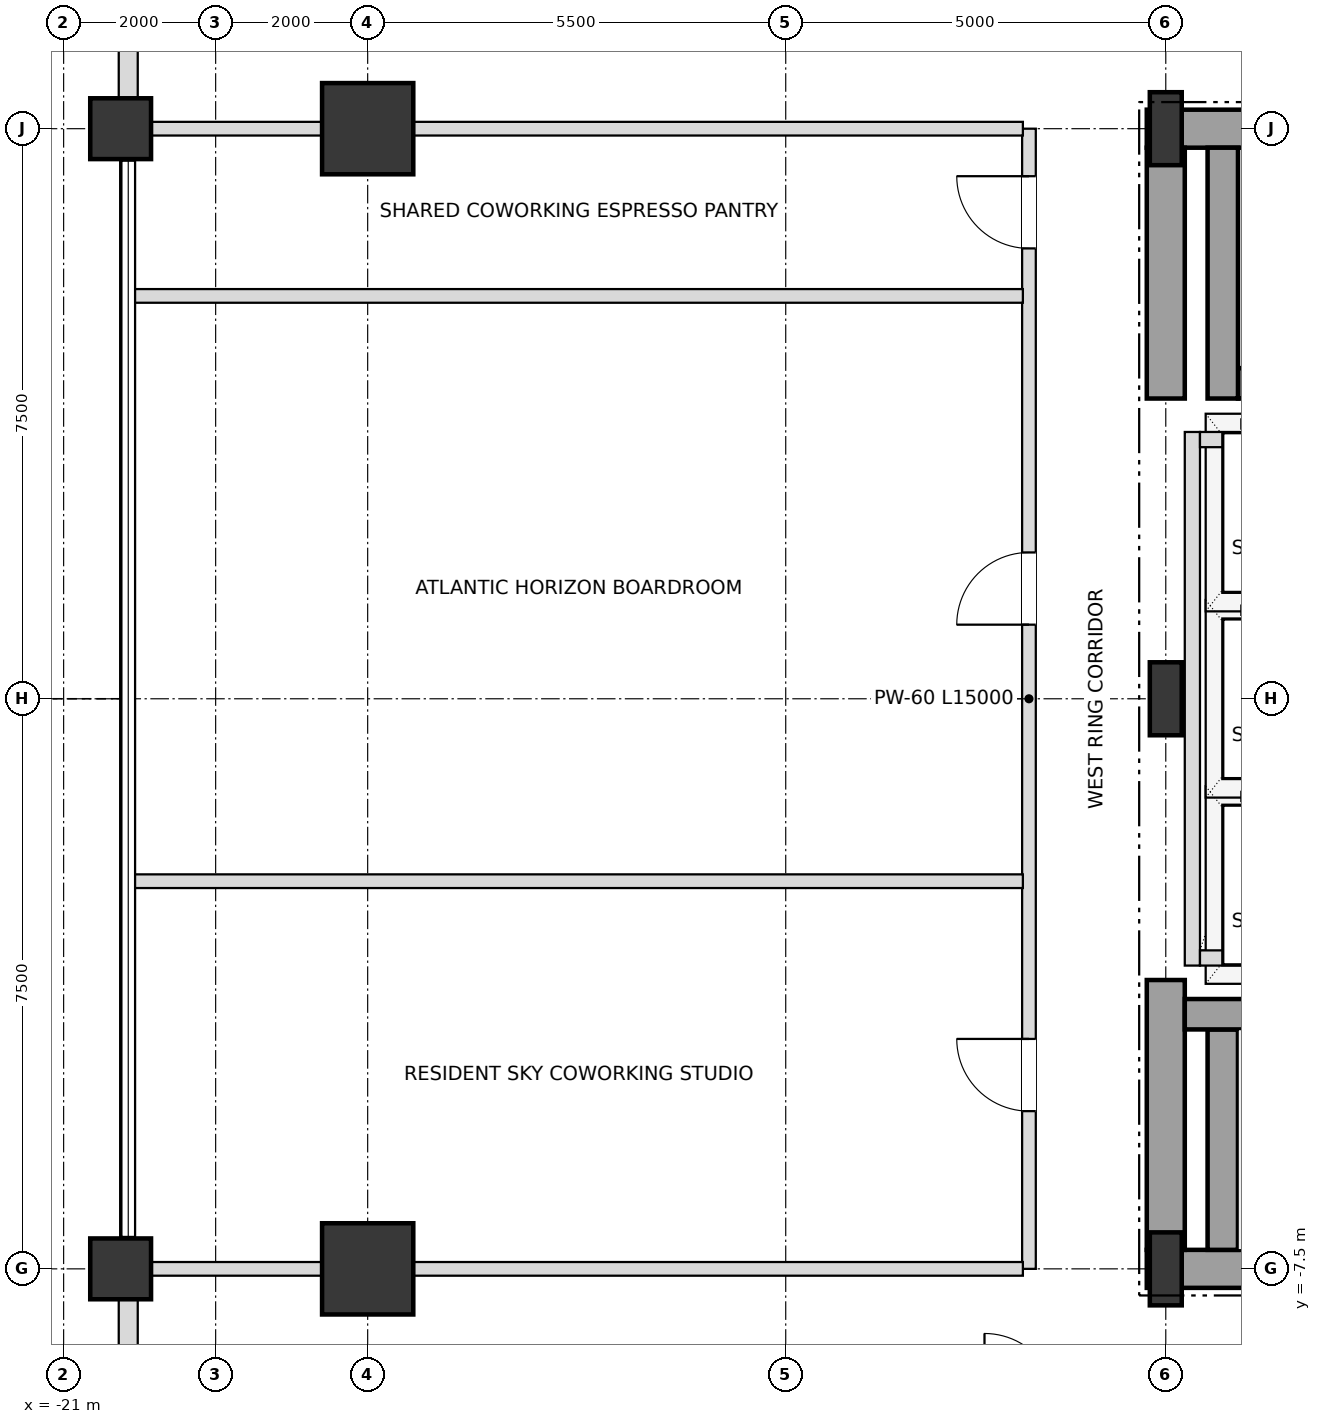
"""IFC4 building model, lengths in metres.
Left out: names, types, materials, properties, quantities, classifications, styles, units other than length and angle.
Written with IfcOpenShell. Run it as: python <this file> out.ifc"""

import sys

from ifc_helpers import new_model, si_unit, direction, frame, frame_2d, origin, origin_2d, place, context, subcontext, project, spatial, rectangle, i_section, extrude, element, fill, save


model = new_model("IFC4")
c1 = context("Model", 3, precision=1e-05, world=origin(), true_north=direction((0.0, 1.0)))
c2 = subcontext(c1, "Body", "Model", "MODEL_VIEW")
j1 = project(units=[si_unit("LENGTHUNIT", "METRE"), si_unit("PLANEANGLEUNIT", "RADIAN")], contexts=[c1])
p1 = place(None, origin())
s1 = spatial("IfcSite", under=j1, at=p1, CompositionType="ELEMENT")
p2 = place(p1, origin())
s2 = spatial("IfcBuilding", under=s1, at=p2, CompositionType="ELEMENT")
p3 = place(p2, frame((0.0, 0.0, 109.8)))
s3 = spatial("IfcBuildingStorey", under=s2, at=p3, CompositionType="ELEMENT", Elevation=109.8)
for number, where, z_axis, x_axis in (
    (1, (-6.5, -7.5, 0.0), (0.0, 0.0, 1.0), (1.0, 0.0, 0.0)),
    (2, (-6.5, 0.0, 0.0), (0.0, 0.0, 1.0), (1.0, 0.0, 0.0)),
    (3, (-6.5, 7.5, 0.0), (0.0, 0.0, 1.0), (1.0, 0.0, 0.0)),
):
    element("IfcColumn", number, at=place(p3, frame(where, z_axis=z_axis, x_axis=x_axis)), inside=s3, PredefinedType="COLUMN", context=c2, shape_type="SweptSolid", body=[
        extrude(i_section(OverallWidth=0.42, OverallDepth=0.96, WebThickness=0.022, FlangeThickness=0.034, at=origin_2d()), origin(), (0.0, 0.0, 1.0), 3.6),
    ])
for number, where, z_axis, x_axis in (
    (4, (-17.0, 7.5, 0.0), (0.0, 0.0, 1.0), (1.0, 0.0, 0.0)),
    (5, (-17.0, -7.5, 0.0), (0.0, 0.0, 1.0), (1.0, 0.0, 0.0)),
):
    element("IfcColumn", number, at=place(p3, frame(where, z_axis=z_axis, x_axis=x_axis)), inside=s3, PredefinedType="USERDEFINED", context=c2, shape_type="SweptSolid", body=[
        extrude(rectangle(XDim=1.2, YDim=1.2, at=origin_2d()), origin(), (0.0, 0.0, 1.0), 3.6),
    ])
for number, where, z_axis, x_axis in (
    (6, (-20.25, -7.5, 0.0), (0.0, 0.0, 1.0), (1.0, 0.0, 0.0)),
    (7, (-20.25, 7.5, 0.0), (0.0, 0.0, 1.0), (1.0, 0.0, 0.0)),
):
    element("IfcColumn", number, at=place(p3, frame(where, z_axis=z_axis, x_axis=x_axis)), inside=s3, PredefinedType="COLUMN", context=c2, shape_type="SweptSolid", body=[
        extrude(rectangle(XDim=0.8, YDim=0.8, at=origin_2d()), origin(), (0.0, 0.0, 1.0), 3.6),
    ])
p4 = place(p3, frame((-20.15, 12.605, 0.0), z_axis=(0.0, 0.0, 1.0), x_axis=(0.0, -1.0, 0.0)))
e8 = element("IfcWall", 8, at=p4, inside=s3, PredefinedType="SOLIDWALL", context=c2, shape_type="SweptSolid", body=[
    extrude(rectangle(XDim=4.71, YDim=0.25, at=frame_2d((2.355, 0.0))), origin(), (0.0, 0.0, 1.0), 2.736),
])
p5 = place(p4, frame((1.455, 0.0, 0.72)))
e9 = element("IfcOpeningElement", 9, at=p5, cuts=e8, PredefinedType="OPENING", context=c2, shape_type="SweptSolid", body=[
    extrude(rectangle(XDim=1.8, YDim=1.68, at=frame_2d((0.9, 0.84))), frame((0.0, 0.135, 0.0), z_axis=(0.0, -1.0, 0.0), x_axis=(1.0, 0.0, 0.0)), (0.0, 0.0, 1.0), 0.27),
])
p6 = place(p3, frame((-20.15, -7.895, 0.0), z_axis=(0.0, 0.0, 1.0), x_axis=(0.0, -1.0, 0.0)))
e10 = element("IfcWall", 10, at=p6, inside=s3, PredefinedType="SOLIDWALL", context=c2, shape_type="SweptSolid", body=[
    extrude(rectangle(XDim=4.71, YDim=0.25, at=frame_2d((2.355, 0.0))), origin(), (0.0, 0.0, 1.0), 2.736),
])
p7 = place(p6, frame((1.455, 0.0, 0.72)))
e11 = element("IfcOpeningElement", 11, at=p7, cuts=e10, PredefinedType="OPENING", context=c2, shape_type="SweptSolid", body=[
    extrude(rectangle(XDim=1.8, YDim=1.68, at=frame_2d((0.9, 0.84))), frame((0.0, 0.135, 0.0), z_axis=(0.0, -1.0, 0.0), x_axis=(1.0, 0.0, 0.0)), (0.0, 0.0, 1.0), 0.27),
])
p8 = place(p3, frame((-6.75, -7.5, 0.0), z_axis=(0.0, 0.0, 1.0), x_axis=(1.0, 0.0, 0.0)))
e12 = element("IfcWall", 12, at=p8, inside=s3, PredefinedType="SHEAR", context=c2, shape_type="SweptSolid", body=[
    extrude(rectangle(XDim=6.75, YDim=0.5, at=frame_2d((3.375, 0.0))), origin(), (0.0, 0.0, 1.0), 3.38),
])
p9 = place(p3, frame((-6.75, 7.5, 0.0), z_axis=(0.0, 0.0, 1.0), x_axis=(1.0, 0.0, 0.0)))
e13 = element("IfcWall", 13, at=p9, inside=s3, PredefinedType="SHEAR", context=c2, shape_type="SweptSolid", body=[
    extrude(rectangle(XDim=6.75, YDim=0.5, at=frame_2d((3.375, 0.0))), origin(), (0.0, 0.0, 1.0), 3.38),
])
p10 = place(p9, frame((1.65, 0.0, 0.0)))
e14 = element("IfcOpeningElement", 14, at=p10, cuts=e13, PredefinedType="OPENING", context=c2, shape_type="SweptSolid", body=[
    extrude(rectangle(XDim=1.05, YDim=2.15, at=frame_2d((0.525, 1.075))), frame((0.0, 0.26, 0.0), z_axis=(0.0, -1.0, 0.0), x_axis=(1.0, 0.0, 0.0)), (0.0, 0.0, 1.0), 0.52),
])
p11 = place(p3, frame((-6.5, -7.25, 0.0), z_axis=(0.0, 0.0, 1.0), x_axis=(0.0, 1.0, 0.0)))
e15 = element("IfcWall", 15, at=p11, inside=s3, PredefinedType="SHEAR", context=c2, shape_type="SweptSolid", body=[
    extrude(rectangle(XDim=3.55, YDim=0.5, at=frame_2d((1.775, 0.0))), origin(), (0.0, 0.0, 1.0), 3.38),
])
p12 = place(p3, frame((-6.5, 3.95, 0.0), z_axis=(0.0, 0.0, 1.0), x_axis=(0.0, 1.0, 0.0)))
e16 = element("IfcWall", 16, at=p12, inside=s3, PredefinedType="SHEAR", context=c2, shape_type="SweptSolid", body=[
    extrude(rectangle(XDim=3.3, YDim=0.5, at=frame_2d((1.65, 0.0))), origin(), (0.0, 0.0, 1.0), 3.38),
])
p13 = place(p3, frame((-5.75, -7.25, 0.0), z_axis=(0.0, 0.0, 1.0), x_axis=(0.0, 1.0, 0.0)))
e17 = element("IfcWall", 17, at=p13, inside=s3, PredefinedType="SHEAR", context=c2, shape_type="SweptSolid", body=[
    extrude(rectangle(XDim=2.9, YDim=0.4, at=frame_2d((1.45, 0.0))), origin(), (0.0, 0.0, 1.0), 3.38),
])
p14 = place(p3, frame((-6.25, -4.15, 0.0), z_axis=(0.0, 0.0, 1.0), x_axis=(1.0, 0.0, 0.0)))
e18 = element("IfcWall", 18, at=p14, inside=s3, PredefinedType="SHEAR", context=c2, shape_type="SweptSolid", body=[
    extrude(rectangle(XDim=7.78, YDim=0.4, at=frame_2d((3.89, 0.0))), origin(), (0.0, 0.0, 1.0), 3.38),
])
p15 = place(p3, frame((-5.55, 4.15, 0.0), z_axis=(0.0, 0.0, 1.0), x_axis=(1.0, 0.0, 0.0)))
e19 = element("IfcWall", 19, at=p15, inside=s3, PredefinedType="SHEAR", context=c2, shape_type="SweptSolid", body=[
    extrude(rectangle(XDim=7.08, YDim=0.4, at=frame_2d((3.54, 0.0))), origin(), (0.0, 0.0, 1.0), 3.38),
])
p16 = place(p3, frame((-5.75, 3.95, 0.0), z_axis=(0.0, 0.0, 1.0), x_axis=(0.0, 1.0, 0.0)))
e20 = element("IfcWall", 20, at=p16, inside=s3, PredefinedType="SHEAR", context=c2, shape_type="SweptSolid", body=[
    extrude(rectangle(XDim=3.3, YDim=0.4, at=frame_2d((1.65, 0.0))), origin(), (0.0, 0.0, 1.0), 3.38),
])
p17 = place(p3, frame((-6.15, -3.51, 0.0), z_axis=(0.0, 0.0, 1.0), x_axis=(0.0, 1.0, 0.0)))
e21 = element("IfcWall", 21, at=p17, inside=s3, PredefinedType="SOLIDWALL", context=c2, shape_type="SweptSolid", body=[
    extrude(rectangle(XDim=7.02, YDim=0.2, at=frame_2d((3.51, 0.0))), origin(), (0.0, 0.0, 1.0), 3.38),
])
for number, where, z_axis, x_axis in (
    (22, (-6.05, -3.41, 0.0), (0.0, 0.0, 1.0), (1.0, 0.0, 0.0)),
    (23, (-6.05, 3.41, 0.0), (0.0, 0.0, 1.0), (1.0, 0.0, 0.0)),
):
    element("IfcWall", number, at=place(p3, frame(where, z_axis=z_axis, x_axis=x_axis)), inside=s3, PredefinedType="SOLIDWALL", context=c2, shape_type="SweptSolid", body=[
        extrude(rectangle(XDim=2.2, YDim=0.2, at=frame_2d((1.1, 0.0))), origin(), (0.0, 0.0, 1.0), 3.38),
    ])
p18 = place(p3, frame((-8.3, -7.5, 0.0), z_axis=(0.0, 0.0, 1.0), x_axis=(0.0, 1.0, 0.0)))
e24 = element("IfcWall", 24, at=p18, inside=s3, PredefinedType="PARTITIONING", context=c2, shape_type="SweptSolid", body=[
    extrude(rectangle(XDim=15.0, YDim=0.18, at=frame_2d((7.5, 0.0))), origin(), (0.0, 0.0, 1.0), 3.38),
])
p19 = place(p18, frame((2.075, 0.0, 0.0)))
e25 = element("IfcOpeningElement", 25, at=p19, cuts=e24, PredefinedType="OPENING", context=c2, shape_type="SweptSolid", body=[
    extrude(rectangle(XDim=0.95, YDim=2.15, at=frame_2d((0.475, 1.075))), frame((0.0, 0.1, 0.0), z_axis=(0.0, -1.0, 0.0), x_axis=(1.0, 0.0, 0.0)), (0.0, 0.0, 1.0), 0.2),
])
p20 = place(p18, frame((8.475, 0.0, 0.0)))
e26 = element("IfcOpeningElement", 26, at=p20, cuts=e24, PredefinedType="OPENING", context=c2, shape_type="SweptSolid", body=[
    extrude(rectangle(XDim=0.95, YDim=2.15, at=frame_2d((0.475, 1.075))), frame((0.0, 0.1, 0.0), z_axis=(0.0, -1.0, 0.0), x_axis=(1.0, 0.0, 0.0)), (0.0, 0.0, 1.0), 0.2),
])
p21 = place(p18, frame((13.425, 0.0, 0.0)))
e27 = element("IfcOpeningElement", 27, at=p21, cuts=e24, PredefinedType="OPENING", context=c2, shape_type="SweptSolid", body=[
    extrude(rectangle(XDim=0.95, YDim=2.15, at=frame_2d((0.475, 1.075))), frame((0.0, 0.1, 0.0), z_axis=(0.0, -1.0, 0.0), x_axis=(1.0, 0.0, 0.0)), (0.0, 0.0, 1.0), 0.2),
])
p22 = place(p3, frame((-20.15, -7.5, 0.0), z_axis=(0.0, 0.0, 1.0), x_axis=(1.0, 0.0, 0.0)))
e28 = element("IfcWall", 28, at=p22, inside=s3, PredefinedType="PARTITIONING", context=c2, shape_type="SweptSolid", body=[
    extrude(rectangle(XDim=11.77, YDim=0.18, at=frame_2d((5.885, 0.0))), origin(), (0.0, 0.0, 1.0), 2.816),
])
for number, where, z_axis, x_axis in (
    (29, (-20.07, -2.4, 0.0), (0.0, 0.0, 1.0), (1.0, 0.0, 0.0)),
    (30, (-20.07, 5.3, 0.0), (0.0, 0.0, 1.0), (1.0, 0.0, 0.0)),
):
    element("IfcWall", number, at=place(p3, frame(where, z_axis=z_axis, x_axis=x_axis)), inside=s3, PredefinedType="PARTITIONING", context=c2, shape_type="SweptSolid", body=[
        extrude(rectangle(XDim=11.69, YDim=0.18, at=frame_2d((5.845, 0.0))), origin(), (0.0, 0.0, 1.0), 2.816),
    ])
p23 = place(p3, frame((-20.15, 7.5, 0.0), z_axis=(0.0, 0.0, 1.0), x_axis=(1.0, 0.0, 0.0)))
e31 = element("IfcWall", 31, at=p23, inside=s3, PredefinedType="PARTITIONING", context=c2, shape_type="SweptSolid", body=[
    extrude(rectangle(XDim=11.77, YDim=0.18, at=frame_2d((5.885, 0.0))), origin(), (0.0, 0.0, 1.0), 2.816),
])
p24 = place(p19, origin())
e32 = element("IfcDoor", 32, at=p24, inside=s3, OperationType="SINGLE_SWING_RIGHT", PredefinedType="DOOR", context=c2, shape_type="SweptSolid", body=[
    extrude(rectangle(XDim=0.95, YDim=2.15, at=frame_2d((0.475, 1.075))), frame((0.0, 0.025, 0.0), z_axis=(0.0, -1.0, 0.0), x_axis=(1.0, 0.0, 0.0)), (0.0, 0.0, 1.0), 0.05),
])
fill(e25, e32)
p25 = place(p20, origin())
e33 = element("IfcDoor", 33, at=p25, inside=s3, OperationType="SINGLE_SWING_LEFT", PredefinedType="DOOR", context=c2, shape_type="SweptSolid", body=[
    extrude(rectangle(XDim=0.95, YDim=2.15, at=frame_2d((0.475, 1.075))), frame((0.0, 0.025, 0.0), z_axis=(0.0, -1.0, 0.0), x_axis=(1.0, 0.0, 0.0)), (0.0, 0.0, 1.0), 0.05),
])
fill(e26, e33)
p26 = place(p21, origin())
e34 = element("IfcDoor", 34, at=p26, inside=s3, OperationType="SINGLE_SWING_RIGHT", PredefinedType="DOOR", context=c2, shape_type="SweptSolid", body=[
    extrude(rectangle(XDim=0.95, YDim=2.15, at=frame_2d((0.475, 1.075))), frame((0.0, 0.025, 0.0), z_axis=(0.0, -1.0, 0.0), x_axis=(1.0, 0.0, 0.0)), (0.0, 0.0, 1.0), 0.05),
])
fill(e27, e34)
save(model, sys.argv[1])
